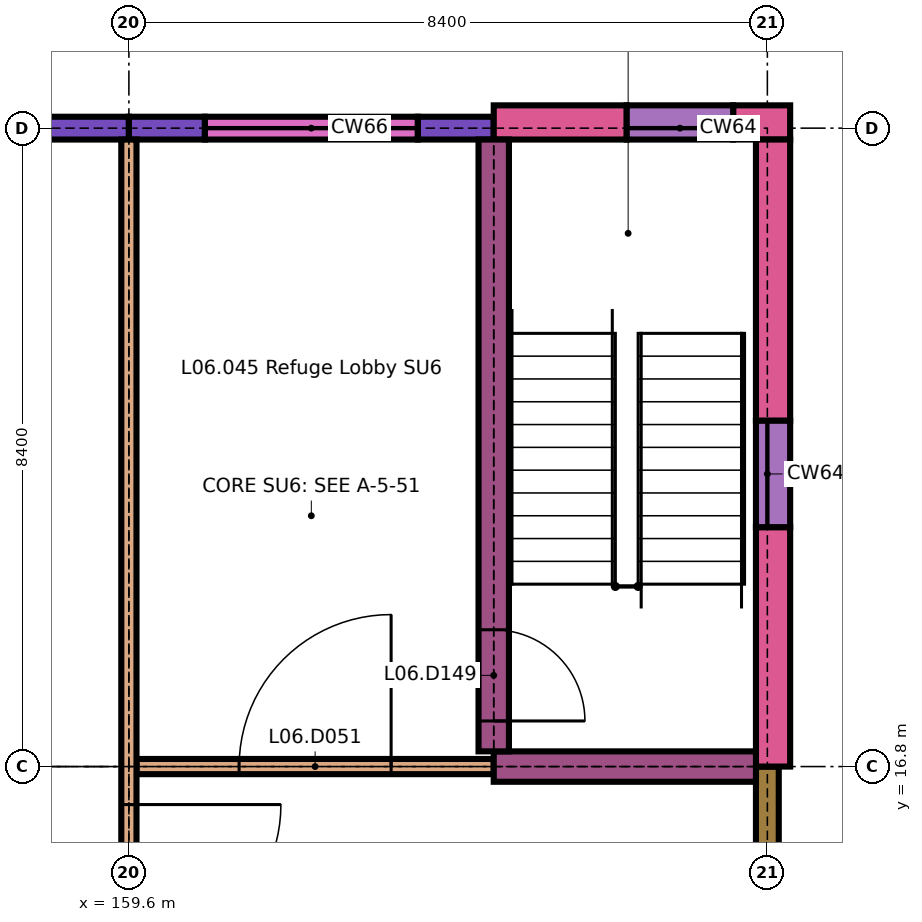
"""IFC4 building model, lengths in metres.
Left out: names, types, materials, properties, quantities, classifications, styles, units other than length and angle.
Written with IfcOpenShell. Run it as: python <this file> out.ifc"""

import sys

from ifc_helpers import new_model, si_unit, direction, frame, frame_2d, origin, place, context, subcontext, project, spatial, rectangle, extrude, element, fill, save


model = new_model("IFC4")
c1 = context("Model", 3, precision=1e-05, world=origin(), true_north=direction((0.0, 1.0)))
c2 = subcontext(c1, "Body", "Model", "MODEL_VIEW")
j1 = project(units=[si_unit("LENGTHUNIT", "METRE"), si_unit("PLANEANGLEUNIT", "RADIAN")], contexts=[c1])
p1 = place(None, origin())
s1 = spatial("IfcSite", under=j1, at=p1, CompositionType="ELEMENT")
p2 = place(p1, origin())
s2 = spatial("IfcBuilding", under=s1, at=p2, CompositionType="ELEMENT")
p3 = place(p2, frame((0.0, 0.0, 26.1)))
s3 = spatial("IfcBuildingStorey", under=s2, at=p3, CompositionType="ELEMENT", Elevation=26.1)
p4 = place(p3, frame((158.25, 25.2, 0.0), z_axis=(0.0, 0.0, 1.0), x_axis=(1.0, 0.0, 0.0)))
e1 = element("IfcWall", 1, at=p4, inside=s3, PredefinedType="SOLIDWALL", context=c2, shape_type="SweptSolid", body=[
    extrude(rectangle(XDim=1.35, YDim=0.3, at=frame_2d((0.675, 0.0))), origin(), (0.0, 0.0, 1.0), 3.3),
])
for number, where, z_axis, x_axis in (
    (2, (159.6, 25.2, 0.0), (0.0, 0.0, 1.0), (1.0, 0.0, 0.0)),
    (3, (163.4, 25.2, 0.0), (0.0, 0.0, 1.0), (1.0, 0.0, 0.0)),
):
    element("IfcWall", number, at=place(p3, frame(where, z_axis=z_axis, x_axis=x_axis)), inside=s3, PredefinedType="SOLIDWALL", context=c2, shape_type="SweptSolid", body=[
        extrude(rectangle(XDim=1.0, YDim=0.3, at=frame_2d((0.5, 0.0))), origin(), (0.0, 0.0, 1.0), 3.3),
    ])
p5 = place(p3, frame((160.6, 25.2, 0.0), z_axis=(0.0, 0.0, 1.0), x_axis=(1.0, 0.0, 0.0)))
e4 = element("IfcWall", 4, at=p5, inside=s3, PredefinedType="SOLIDWALL", context=c2, shape_type="SweptSolid", body=[
    extrude(rectangle(XDim=2.8, YDim=0.3, at=frame_2d((1.4, 0.0))), origin(), (0.0, 0.0, 1.0), 0.6),
])
p6 = place(p3, frame((164.4, 25.275, 0.0), z_axis=(0.0, 0.0, 1.0), x_axis=(1.0, 0.0, 0.0)))
e5 = element("IfcWall", 5, at=p6, inside=s3, PredefinedType="SOLIDWALL", context=c2, shape_type="SweptSolid", body=[
    extrude(rectangle(XDim=1.75, YDim=0.45, at=frame_2d((0.875, 0.0))), origin(), (0.0, 0.0, 1.0), 3.3),
])
p7 = place(p3, frame((167.55, 25.275, 0.0), z_axis=(0.0, 0.0, 1.0), x_axis=(1.0, 0.0, 0.0)))
e6 = element("IfcWall", 6, at=p7, inside=s3, PredefinedType="SOLIDWALL", context=c2, shape_type="SweptSolid", body=[
    extrude(rectangle(XDim=0.75, YDim=0.45, at=frame_2d((0.375, 0.0))), origin(), (0.0, 0.0, 1.0), 3.3),
])
p8 = place(p3, frame((166.15, 25.275, 0.0), z_axis=(0.0, 0.0, 1.0), x_axis=(1.0, 0.0, 0.0)))
e7 = element("IfcWall", 7, at=p8, inside=s3, PredefinedType="SOLIDWALL", context=c2, shape_type="SweptSolid", body=[
    extrude(rectangle(XDim=1.4, YDim=0.45, at=frame_2d((0.7, 0.0))), origin(), (0.0, 0.0, 1.0), 0.6),
])
p9 = place(p3, frame((168.0, 13.8, 0.0), z_axis=(0.0, 0.0, 1.0), x_axis=(0.0, 1.0, 0.0)))
e8 = element("IfcWall", 8, at=p9, inside=s3, PredefinedType="SOLIDWALL", context=c2, shape_type="SweptSolid", body=[
    extrude(rectangle(XDim=3.0, YDim=0.3, at=frame_2d((1.5, 0.0))), origin(), (0.0, 0.0, 1.0), 2.9),
])
p10 = place(p9, frame((0.45, 0.0, 0.9)))
e9 = element("IfcOpeningElement", 9, at=p10, cuts=e8, PredefinedType="OPENING", context=c2, shape_type="SweptSolid", body=[
    extrude(rectangle(XDim=0.9, YDim=1.5, at=frame_2d((0.45, 0.75))), frame((0.0, 0.16, 0.0), z_axis=(0.0, -1.0, 0.0), x_axis=(1.0, 0.0, 0.0)), (0.0, 0.0, 1.0), 0.32),
])
p11 = place(p3, frame((168.075, 16.8, 0.0), z_axis=(0.0, 0.0, 1.0), x_axis=(0.0, 1.0, 0.0)))
e10 = element("IfcWall", 10, at=p11, inside=s3, PredefinedType="SOLIDWALL", context=c2, shape_type="SweptSolid", body=[
    extrude(rectangle(XDim=3.15, YDim=0.45, at=frame_2d((1.575, 0.0))), origin(), (0.0, 0.0, 1.0), 3.3),
])
p12 = place(p3, frame((168.075, 21.35, 0.0), z_axis=(0.0, 0.0, 1.0), x_axis=(0.0, 1.0, 0.0)))
e11 = element("IfcWall", 11, at=p12, inside=s3, PredefinedType="SOLIDWALL", context=c2, shape_type="SweptSolid", body=[
    extrude(rectangle(XDim=3.7, YDim=0.45, at=frame_2d((1.85, 0.0))), origin(), (0.0, 0.0, 1.0), 3.3),
])
p13 = place(p3, frame((168.075, 19.95, 0.0), z_axis=(0.0, 0.0, 1.0), x_axis=(0.0, 1.0, 0.0)))
e12 = element("IfcWall", 12, at=p13, inside=s3, PredefinedType="SOLIDWALL", context=c2, shape_type="SweptSolid", body=[
    extrude(rectangle(XDim=1.4, YDim=0.45, at=frame_2d((0.7, 0.0))), origin(), (0.0, 0.0, 1.0), 0.6),
])
p14 = place(p3, frame((159.7, 16.8, 0.0), z_axis=(0.0, 0.0, 1.0), x_axis=(1.0, 0.0, 0.0)))
e13 = element("IfcWall", 13, at=p14, inside=s3, PredefinedType="PARTITIONING", context=c2, shape_type="SweptSolid", body=[
    extrude(rectangle(XDim=4.7, YDim=0.2, at=frame_2d((2.35, 0.0))), origin(), (0.0, 0.0, 1.0), 3.3),
])
p15 = place(p14, frame((1.35, 0.0, 0.0)))
e14 = element("IfcOpeningElement", 14, at=p15, cuts=e13, PredefinedType="OPENING", context=c2, shape_type="SweptSolid", body=[
    extrude(rectangle(XDim=2.0, YDim=2.4, at=frame_2d((1.0, 1.2))), frame((0.0, 0.11, 0.0), z_axis=(0.0, -1.0, 0.0), x_axis=(1.0, 0.0, 0.0)), (0.0, 0.0, 1.0), 0.22),
])
p16 = place(p3, frame((164.4, 16.8, 0.0), z_axis=(0.0, 0.0, 1.0), x_axis=(1.0, 0.0, 0.0)))
e15 = element("IfcWall", 15, at=p16, inside=s3, PredefinedType="SHEAR", context=c2, shape_type="SweptSolid", body=[
    extrude(rectangle(XDim=3.45, YDim=0.4, at=frame_2d((1.725, 0.0))), origin(), (0.0, 0.0, 1.0), 3.3),
])
p17 = place(p3, frame((159.6, 8.75, 0.0), z_axis=(0.0, 0.0, 1.0), x_axis=(0.0, 1.0, 0.0)))
e16 = element("IfcWall", 16, at=p17, inside=s3, PredefinedType="PARTITIONING", context=c2, shape_type="SweptSolid", body=[
    extrude(rectangle(XDim=16.3, YDim=0.2, at=frame_2d((8.15, 0.0))), origin(), (0.0, 0.0, 1.0), 3.3),
])
p18 = place(p17, frame((0.325, 0.0, 0.0)))
e17 = element("IfcOpeningElement", 17, at=p18, cuts=e16, PredefinedType="OPENING", context=c2, shape_type="SweptSolid", body=[
    extrude(rectangle(XDim=2.0, YDim=2.4, at=frame_2d((1.0, 1.2))), frame((0.0, 0.11, 0.0), z_axis=(0.0, -1.0, 0.0), x_axis=(1.0, 0.0, 0.0)), (0.0, 0.0, 1.0), 0.22),
])
p19 = place(p17, frame((5.55, 0.0, 0.0)))
e18 = element("IfcOpeningElement", 18, at=p19, cuts=e16, PredefinedType="OPENING", context=c2, shape_type="SweptSolid", body=[
    extrude(rectangle(XDim=2.0, YDim=2.4, at=frame_2d((1.0, 1.2))), frame((0.0, 0.11, 0.0), z_axis=(0.0, -1.0, 0.0), x_axis=(1.0, 0.0, 0.0)), (0.0, 0.0, 1.0), 0.22),
])
p20 = place(p3, frame((164.4, 17.0, 0.0), z_axis=(0.0, 0.0, 1.0), x_axis=(0.0, 1.0, 0.0)))
e19 = element("IfcWall", 19, at=p20, inside=s3, PredefinedType="SHEAR", context=c2, shape_type="SweptSolid", body=[
    extrude(rectangle(XDim=8.05, YDim=0.4, at=frame_2d((4.025, 0.0))), origin(), (0.0, 0.0, 1.0), 3.3),
])
p21 = place(p20, frame((0.4, 0.0, 0.0)))
e20 = element("IfcOpeningElement", 20, at=p21, cuts=e19, PredefinedType="OPENING", context=c2, shape_type="SweptSolid", body=[
    extrude(rectangle(XDim=1.2, YDim=2.1, at=frame_2d((0.6, 1.05))), frame((0.0, 0.21, 0.0), z_axis=(0.0, -1.0, 0.0), x_axis=(1.0, 0.0, 0.0)), (0.0, 0.0, 1.0), 0.42),
])
p22 = place(p15, origin())
e21 = element("IfcDoor", 21, at=p22, inside=s3, OperationType="SINGLE_SWING_LEFT", PredefinedType="DOOR", context=c2, shape_type="SweptSolid", body=[
    extrude(rectangle(XDim=2.0, YDim=2.4, at=frame_2d((1.0, 1.2))), frame((0.0, 0.03, 0.0), z_axis=(0.0, -1.0, 0.0), x_axis=(1.0, 0.0, 0.0)), (0.0, 0.0, 1.0), 0.06),
])
fill(e14, e21)
p23 = place(p19, origin())
e22 = element("IfcDoor", 22, at=p23, inside=s3, OperationType="SINGLE_SWING_RIGHT", PredefinedType="DOOR", context=c2, shape_type="SweptSolid", body=[
    extrude(rectangle(XDim=2.0, YDim=2.4, at=frame_2d((1.0, 1.2))), frame((0.0, 0.03, 0.0), z_axis=(0.0, -1.0, 0.0), x_axis=(1.0, 0.0, 0.0)), (0.0, 0.0, 1.0), 0.06),
])
fill(e18, e22)
p24 = place(p21, origin())
e23 = element("IfcDoor", 23, at=p24, inside=s3, OperationType="SINGLE_SWING_LEFT", PredefinedType="DOOR", context=c2, shape_type="SweptSolid", body=[
    extrude(rectangle(XDim=1.2, YDim=2.1, at=frame_2d((0.6, 1.05))), frame((0.0, 0.025, 0.0), z_axis=(0.0, -1.0, 0.0), x_axis=(1.0, 0.0, 0.0)), (0.0, 0.0, 1.0), 0.05),
])
fill(e20, e23)
save(model, sys.argv[1])
